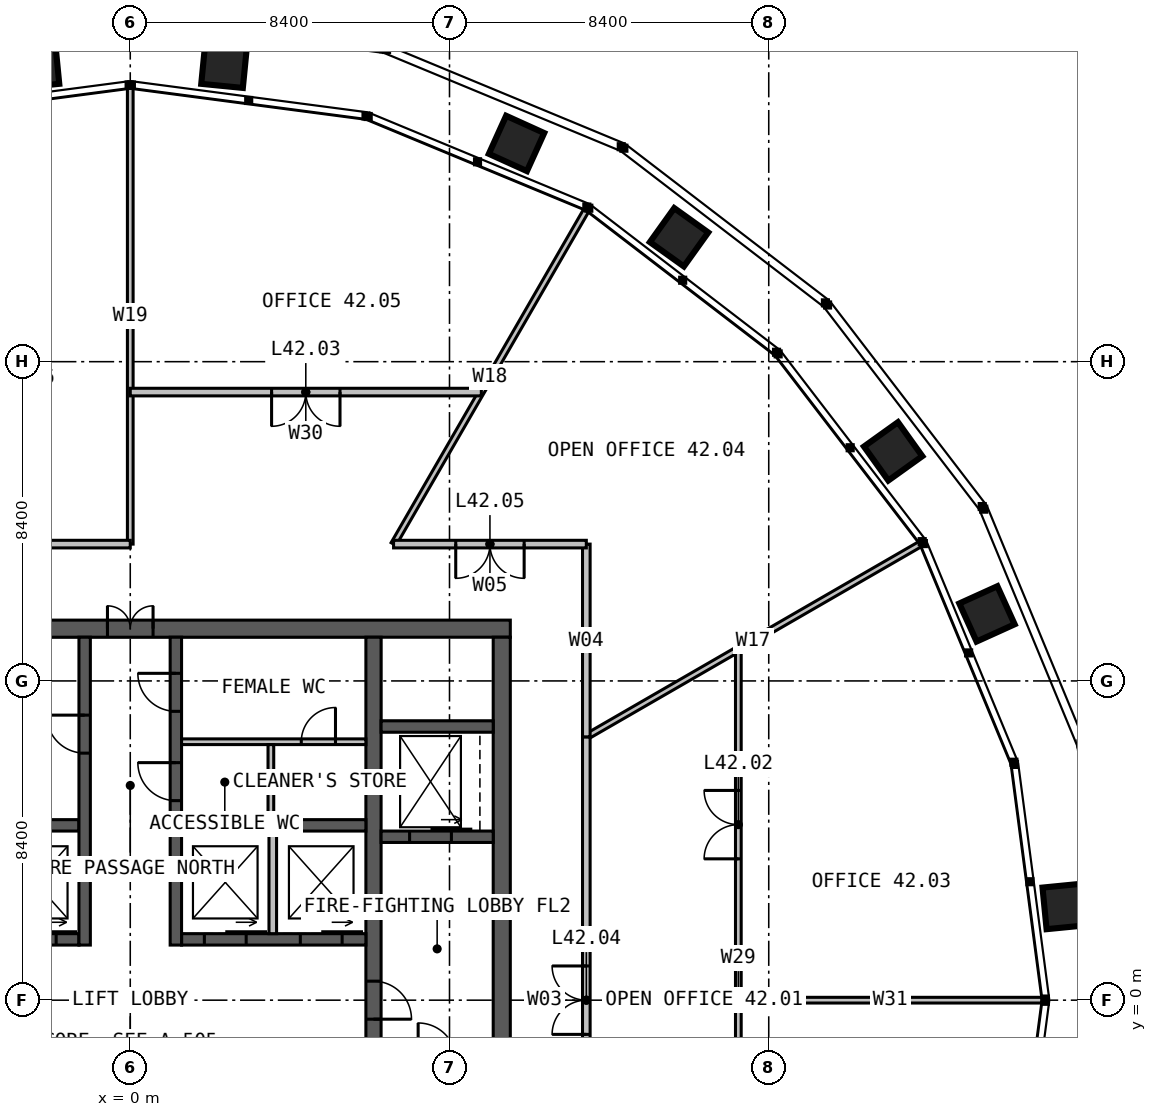
"""IFC4 building model, lengths in metres.
Left out: names, types, materials, properties, quantities, classifications, styles, units other than length and angle.
Written with IfcOpenShell. Run it as: python <this file> out.ifc"""

import sys

from ifc_helpers import new_model, si_unit, direction, frame, frame_2d, origin, place, context, subcontext, project, spatial, rectangle, extrude, element, fill, save


model = new_model("IFC4")
c1 = context("Model", 3, precision=1e-05, world=origin(), true_north=direction((0.0, 1.0)))
c2 = subcontext(c1, "Body", "Model", "MODEL_VIEW")
j1 = project(units=[si_unit("LENGTHUNIT", "METRE"), si_unit("PLANEANGLEUNIT", "RADIAN")], contexts=[c1])
p1 = place(None, origin())
s1 = spatial("IfcSite", under=j1, at=p1, CompositionType="ELEMENT")
p2 = place(p1, origin())
s2 = spatial("IfcBuilding", under=s1, at=p2, CompositionType="ELEMENT")
p3 = place(p2, frame((0.0, 0.0, 175.0)))
s3 = spatial("IfcBuildingStorey", under=s2, at=p3, CompositionType="ELEMENT", Elevation=175.0)
p4 = place(p3, frame((-10.0, 9.775, 0.0), z_axis=(0.0, 0.0, 1.0), x_axis=(1.0, 0.0, 0.0)))
e1 = element("IfcWall", 1, at=p4, inside=s3, PredefinedType="SOLIDWALL", context=c2, shape_type="SweptSolid", body=[
    extrude(rectangle(XDim=20.0, YDim=0.45, at=frame_2d((10.0, 0.0))), origin(), (0.0, 0.0, 1.0), 4.0),
])
p5 = place(p4, frame((9.4, 0.0, 0.0)))
e2 = element("IfcOpeningElement", 2, at=p5, cuts=e1, PredefinedType="OPENING", context=c2, shape_type="SweptSolid", body=[
    extrude(rectangle(XDim=1.2, YDim=2.2, at=frame_2d((0.6, 1.1))), frame((0.0, 0.235, 0.0), z_axis=(0.0, -1.0, 0.0), x_axis=(1.0, 0.0, 0.0)), (0.0, 0.0, 1.0), 0.47),
])
p6 = place(p3, frame((9.775, -9.55, 0.0), z_axis=(0.0, 0.0, 1.0), x_axis=(0.0, 1.0, 0.0)))
e3 = element("IfcWall", 3, at=p6, inside=s3, PredefinedType="SOLIDWALL", context=c2, shape_type="SweptSolid", body=[
    extrude(rectangle(XDim=19.1, YDim=0.45, at=frame_2d((9.55, 0.0))), origin(), (0.0, 0.0, 1.0), 4.0),
])
p7 = place(p3, frame((6.4, 9.55, 0.0), z_axis=(0.0, 0.0, 1.0), x_axis=(0.0, -1.0, 0.0)))
e4 = element("IfcWall", 4, at=p7, inside=s3, PredefinedType="SOLIDWALL", context=c2, shape_type="SweptSolid", body=[
    extrude(rectangle(XDim=19.1, YDim=0.4, at=frame_2d((9.55, 0.0))), origin(), (0.0, 0.0, 1.0), 4.0),
])
p8 = place(p7, frame((9.05, 0.0, 0.0)))
e5 = element("IfcOpeningElement", 5, at=p8, cuts=e4, PredefinedType="OPENING", context=c2, shape_type="SweptSolid", body=[
    extrude(rectangle(XDim=1.0, YDim=2.2, at=frame_2d((0.5, 1.1))), frame((0.0, 0.21, 0.0), z_axis=(0.0, -1.0, 0.0), x_axis=(1.0, 0.0, 0.0)), (0.0, 0.0, 1.0), 0.42),
])
p9 = place(p3, frame((-6.2, 1.6, 0.0), z_axis=(0.0, 0.0, 1.0), x_axis=(1.0, 0.0, 0.0)))
e6 = element("IfcWall", 6, at=p9, inside=s3, PredefinedType="SOLIDWALL", context=c2, shape_type="SweptSolid", body=[
    extrude(rectangle(XDim=4.85, YDim=0.3, at=frame_2d((2.425, 0.0))), origin(), (0.0, 0.0, 1.0), 4.0),
])
p10 = place(p9, frame((0.625, 0.0, 0.0)))
e7 = element("IfcOpeningElement", 7, at=p10, cuts=e6, PredefinedType="OPENING", context=c2, shape_type="SweptSolid", body=[
    extrude(rectangle(XDim=1.1, YDim=2.2, at=frame_2d((0.55, 1.1))), frame((0.0, 0.16, 0.0), z_axis=(0.0, -1.0, 0.0), x_axis=(1.0, 0.0, 0.0)), (0.0, 0.0, 1.0), 0.32),
])
p11 = place(p9, frame((3.15, 0.0, 0.0)))
e8 = element("IfcOpeningElement", 8, at=p11, cuts=e6, PredefinedType="OPENING", context=c2, shape_type="SweptSolid", body=[
    extrude(rectangle(XDim=1.1, YDim=2.2, at=frame_2d((0.55, 1.1))), frame((0.0, 0.16, 0.0), z_axis=(0.0, -1.0, 0.0), x_axis=(1.0, 0.0, 0.0)), (0.0, 0.0, 1.0), 0.32),
])
p12 = place(p3, frame((1.35, 1.6, 0.0), z_axis=(0.0, 0.0, 1.0), x_axis=(1.0, 0.0, 0.0)))
e9 = element("IfcWall", 9, at=p12, inside=s3, PredefinedType="SOLIDWALL", context=c2, shape_type="SweptSolid", body=[
    extrude(rectangle(XDim=4.85, YDim=0.3, at=frame_2d((2.425, 0.0))), origin(), (0.0, 0.0, 1.0), 4.0),
])
p13 = place(p12, frame((0.6, 0.0, 0.0)))
e10 = element("IfcOpeningElement", 10, at=p13, cuts=e9, PredefinedType="OPENING", context=c2, shape_type="SweptSolid", body=[
    extrude(rectangle(XDim=1.1, YDim=2.2, at=frame_2d((0.55, 1.1))), frame((0.0, 0.16, 0.0), z_axis=(0.0, -1.0, 0.0), x_axis=(1.0, 0.0, 0.0)), (0.0, 0.0, 1.0), 0.32),
])
p14 = place(p12, frame((3.125, 0.0, 0.0)))
e11 = element("IfcOpeningElement", 11, at=p14, cuts=e9, PredefinedType="OPENING", context=c2, shape_type="SweptSolid", body=[
    extrude(rectangle(XDim=1.1, YDim=2.2, at=frame_2d((0.55, 1.1))), frame((0.0, 0.16, 0.0), z_axis=(0.0, -1.0, 0.0), x_axis=(1.0, 0.0, 0.0)), (0.0, 0.0, 1.0), 0.32),
])
for number, where, z_axis, x_axis in (
    (12, (-6.2, 4.6, 0.0), (0.0, 0.0, 1.0), (1.0, 0.0, 0.0)),
    (13, (1.35, 4.6, 0.0), (0.0, 0.0, 1.0), (1.0, 0.0, 0.0)),
):
    element("IfcWall", number, at=place(p3, frame(where, z_axis=z_axis, x_axis=x_axis)), inside=s3, PredefinedType="SOLIDWALL", context=c2, shape_type="SweptSolid", body=[
        extrude(rectangle(XDim=4.85, YDim=0.3, at=frame_2d((2.425, 0.0))), origin(), (0.0, 0.0, 1.0), 4.0),
    ])
p15 = place(p3, frame((-1.2, 1.45, 0.0), z_axis=(0.0, 0.0, 1.0), x_axis=(0.0, 1.0, 0.0)))
e14 = element("IfcWall", 14, at=p15, inside=s3, PredefinedType="SOLIDWALL", context=c2, shape_type="SweptSolid", body=[
    extrude(rectangle(XDim=8.1, YDim=0.3, at=frame_2d((4.05, 0.0))), origin(), (0.0, 0.0, 1.0), 4.0),
])
p16 = place(p15, frame((5.05, 0.0, 0.0)))
e15 = element("IfcOpeningElement", 15, at=p16, cuts=e14, PredefinedType="OPENING", context=c2, shape_type="SweptSolid", body=[
    extrude(rectangle(XDim=1.0, YDim=2.2, at=frame_2d((0.5, 1.1))), frame((0.0, 0.16, 0.0), z_axis=(0.0, -1.0, 0.0), x_axis=(1.0, 0.0, 0.0)), (0.0, 0.0, 1.0), 0.32),
])
p17 = place(p3, frame((1.2, 1.45, 0.0), z_axis=(0.0, 0.0, 1.0), x_axis=(0.0, 1.0, 0.0)))
e16 = element("IfcWall", 16, at=p17, inside=s3, PredefinedType="SOLIDWALL", context=c2, shape_type="SweptSolid", body=[
    extrude(rectangle(XDim=8.1, YDim=0.3, at=frame_2d((4.05, 0.0))), origin(), (0.0, 0.0, 1.0), 4.0),
])
p18 = place(p17, frame((3.8, 0.0, 0.0)))
e17 = element("IfcOpeningElement", 17, at=p18, cuts=e16, PredefinedType="OPENING", context=c2, shape_type="SweptSolid", body=[
    extrude(rectangle(XDim=1.0, YDim=2.2, at=frame_2d((0.5, 1.1))), frame((0.0, 0.16, 0.0), z_axis=(0.0, -1.0, 0.0), x_axis=(1.0, 0.0, 0.0)), (0.0, 0.0, 1.0), 0.32),
])
p19 = place(p17, frame((6.15, 0.0, 0.0)))
e18 = element("IfcOpeningElement", 18, at=p19, cuts=e16, PredefinedType="OPENING", context=c2, shape_type="SweptSolid", body=[
    extrude(rectangle(XDim=1.0, YDim=2.2, at=frame_2d((0.5, 1.1))), frame((0.0, 0.16, 0.0), z_axis=(0.0, -1.0, 0.0), x_axis=(1.0, 0.0, 0.0)), (0.0, 0.0, 1.0), 0.32),
])
p20 = place(p3, frame((6.6, 4.3, 0.0), z_axis=(0.0, 0.0, 1.0), x_axis=(1.0, 0.0, 0.0)))
e19 = element("IfcWall", 19, at=p20, inside=s3, PredefinedType="SOLIDWALL", context=c2, shape_type="SweptSolid", body=[
    extrude(rectangle(XDim=2.95, YDim=0.3, at=frame_2d((1.475, 0.0))), origin(), (0.0, 0.0, 1.0), 4.0),
])
p21 = place(p20, frame((0.75, 0.0, 0.0)))
e20 = element("IfcOpeningElement", 20, at=p21, cuts=e19, PredefinedType="OPENING", context=c2, shape_type="SweptSolid", body=[
    extrude(rectangle(XDim=1.1, YDim=2.2, at=frame_2d((0.55, 1.1))), frame((0.0, 0.16, 0.0), z_axis=(0.0, -1.0, 0.0), x_axis=(1.0, 0.0, 0.0)), (0.0, 0.0, 1.0), 0.32),
])
p22 = place(p3, frame((6.6, 7.2, 0.0), z_axis=(0.0, 0.0, 1.0), x_axis=(1.0, 0.0, 0.0)))
e21 = element("IfcWall", 21, at=p22, inside=s3, PredefinedType="SOLIDWALL", context=c2, shape_type="SweptSolid", body=[
    extrude(rectangle(XDim=2.95, YDim=0.3, at=frame_2d((1.475, 0.0))), origin(), (0.0, 0.0, 1.0), 4.0),
])
p23 = place(p3, frame((3.75, 1.75, 0.0), z_axis=(0.0, 0.0, 1.0), x_axis=(0.0, 1.0, 0.0)))
e22 = element("IfcWall", 22, at=p23, inside=s3, PredefinedType="SOLIDWALL", context=c2, shape_type="SweptSolid", body=[
    extrude(rectangle(XDim=2.7, YDim=0.2, at=frame_2d((1.35, 0.0))), origin(), (0.0, 0.0, 1.0), 3.75),
])
p24 = place(p3, frame((1.35, 6.8, 0.0), z_axis=(0.0, 0.0, 1.0), x_axis=(1.0, 0.0, 0.0)))
e23 = element("IfcWall", 23, at=p24, inside=s3, PredefinedType="PARTITIONING", context=c2, shape_type="SweptSolid", body=[
    extrude(rectangle(XDim=4.85, YDim=0.15, at=frame_2d((2.425, 0.0))), origin(), (0.0, 0.0, 1.0), 3.75),
])
p25 = place(p24, frame((3.15, 0.0, 0.0)))
e24 = element("IfcOpeningElement", 24, at=p25, cuts=e23, PredefinedType="OPENING", context=c2, shape_type="SweptSolid", body=[
    extrude(rectangle(XDim=0.9, YDim=2.2, at=frame_2d((0.45, 1.1))), frame((0.0, 0.085, 0.0), z_axis=(0.0, -1.0, 0.0), x_axis=(1.0, 0.0, 0.0)), (0.0, 0.0, 1.0), 0.17),
])
p26 = place(p3, frame((3.7, 4.75, 0.0), z_axis=(0.0, 0.0, 1.0), x_axis=(0.0, 1.0, 0.0)))
e25 = element("IfcWall", 25, at=p26, inside=s3, PredefinedType="PARTITIONING", context=c2, shape_type="SweptSolid", body=[
    extrude(rectangle(XDim=1.975, YDim=0.15, at=frame_2d((0.988, 0.0))), origin(), (0.0, 0.0, 1.0), 3.75),
])
for number, where, z_axis, x_axis in (
    (26, (12.0, 6.928, 0.0), (0.0, 0.0, 1.0), (0.866, 0.5, 0.0)),
    (27, (6.928, 12.0, 0.0), (0.0, 0.0, 1.0), (0.5, 0.866, 0.0)),
):
    element("IfcWall", number, at=place(p3, frame(where, z_axis=z_axis, x_axis=x_axis)), inside=s3, PredefinedType="PARTITIONING", context=c2, shape_type="SweptSolid", body=[
        extrude(rectangle(XDim=10.136, YDim=0.15, at=frame_2d((5.068, 0.0))), origin(), (0.0, 0.0, 1.0), 2.79),
    ])
p27 = place(p3, frame((0.0, 12.0, 0.0), z_axis=(0.0, 0.0, 1.0), x_axis=(0.0, 1.0, 0.0)))
e28 = element("IfcWall", 28, at=p27, inside=s3, PredefinedType="PARTITIONING", context=c2, shape_type="SweptSolid", body=[
    extrude(rectangle(XDim=11.992, YDim=0.15, at=frame_2d((5.996, 0.0))), origin(), (0.0, 0.0, 1.0), 2.79),
])
p28 = place(p3, frame((16.0, -9.238, 0.0), z_axis=(0.0, 0.0, 1.0), x_axis=(0.0, 1.0, 0.0)))
e29 = element("IfcWall", 29, at=p28, inside=s3, PredefinedType="PARTITIONING", context=c2, shape_type="SweptSolid", body=[
    extrude(rectangle(XDim=18.475, YDim=0.15, at=frame_2d((9.238, 0.0))), origin(), (0.0, 0.0, 1.0), 2.79),
])
p29 = place(p28, frame((3.719, 0.0, 0.0)))
e30 = element("IfcOpeningElement", 30, at=p29, cuts=e29, PredefinedType="OPENING", context=c2, shape_type="SweptSolid", body=[
    extrude(rectangle(XDim=1.8, YDim=2.2, at=frame_2d((0.9, 1.1))), frame((0.0, 0.085, 0.0), z_axis=(0.0, -1.0, 0.0), x_axis=(1.0, 0.0, 0.0)), (0.0, 0.0, 1.0), 0.17),
])
p30 = place(p28, frame((12.956, 0.0, 0.0)))
e31 = element("IfcOpeningElement", 31, at=p30, cuts=e29, PredefinedType="OPENING", context=c2, shape_type="SweptSolid", body=[
    extrude(rectangle(XDim=1.8, YDim=2.2, at=frame_2d((0.9, 1.1))), frame((0.0, 0.085, 0.0), z_axis=(0.0, -1.0, 0.0), x_axis=(1.0, 0.0, 0.0)), (0.0, 0.0, 1.0), 0.17),
])
p31 = place(p3, frame((16.0, 0.0, 0.0), z_axis=(0.0, 0.0, 1.0), x_axis=(1.0, 0.0, 0.0)))
e32 = element("IfcWall", 32, at=p31, inside=s3, PredefinedType="PARTITIONING", context=c2, shape_type="SweptSolid", body=[
    extrude(rectangle(XDim=7.992, YDim=0.15, at=frame_2d((3.996, 0.0))), origin(), (0.0, 0.0, 1.0), 2.79),
])
p32 = place(p3, frame((12.0, -6.928, 0.0), z_axis=(0.0, 0.0, 1.0), x_axis=(0.0, 1.0, 0.0)))
e33 = element("IfcWall", 33, at=p32, inside=s3, PredefinedType="PARTITIONING", context=c2, shape_type="SweptSolid", body=[
    extrude(rectangle(XDim=13.856, YDim=0.2, at=frame_2d((6.928, 0.0))), origin(), (0.0, 0.0, 1.0), 3.8),
])
p33 = place(p32, frame((6.028, 0.0, 0.0)))
e34 = element("IfcOpeningElement", 34, at=p33, cuts=e33, PredefinedType="OPENING", context=c2, shape_type="SweptSolid", body=[
    extrude(rectangle(XDim=1.8, YDim=2.2, at=frame_2d((0.9, 1.1))), frame((0.0, 0.11, 0.0), z_axis=(0.0, -1.0, 0.0), x_axis=(1.0, 0.0, 0.0)), (0.0, 0.0, 1.0), 0.22),
])
p34 = place(p3, frame((12.0, 6.928, 0.0), z_axis=(0.0, 0.0, 1.0), x_axis=(0.0, 1.0, 0.0)))
e35 = element("IfcWall", 35, at=p34, inside=s3, PredefinedType="PARTITIONING", context=c2, shape_type="SweptSolid", body=[
    extrude(rectangle(XDim=5.072, YDim=0.2, at=frame_2d((2.536, 0.0))), origin(), (0.0, 0.0, 1.0), 3.8),
])
p35 = place(p3, frame((12.0, 12.0, 0.0), z_axis=(0.0, 0.0, 1.0), x_axis=(-1.0, 0.0, 0.0)))
e36 = element("IfcWall", 36, at=p35, inside=s3, PredefinedType="PARTITIONING", context=c2, shape_type="SweptSolid", body=[
    extrude(rectangle(XDim=5.072, YDim=0.2, at=frame_2d((2.536, 0.0))), origin(), (0.0, 0.0, 1.0), 3.8),
])
p36 = place(p35, frame((1.636, 0.0, 0.0)))
e37 = element("IfcOpeningElement", 37, at=p36, cuts=e36, PredefinedType="OPENING", context=c2, shape_type="SweptSolid", body=[
    extrude(rectangle(XDim=1.8, YDim=2.2, at=frame_2d((0.9, 1.1))), frame((0.0, 0.11, 0.0), z_axis=(0.0, -1.0, 0.0), x_axis=(1.0, 0.0, 0.0)), (0.0, 0.0, 1.0), 0.22),
])
p37 = place(p3, frame((9.238, 16.0, 0.0), z_axis=(0.0, 0.0, 1.0), x_axis=(-1.0, 0.0, 0.0)))
e38 = element("IfcWall", 38, at=p37, inside=s3, PredefinedType="PARTITIONING", context=c2, shape_type="SweptSolid", body=[
    extrude(rectangle(XDim=9.238, YDim=0.2, at=frame_2d((4.619, 0.0))), origin(), (0.0, 0.0, 1.0), 3.8),
])
p38 = place(p37, frame((3.719, 0.0, 0.0)))
e39 = element("IfcOpeningElement", 39, at=p38, cuts=e38, PredefinedType="OPENING", context=c2, shape_type="SweptSolid", body=[
    extrude(rectangle(XDim=1.8, YDim=2.2, at=frame_2d((0.9, 1.1))), frame((0.0, 0.11, 0.0), z_axis=(0.0, -1.0, 0.0), x_axis=(1.0, 0.0, 0.0)), (0.0, 0.0, 1.0), 0.22),
])
p39 = place(p3, frame((0.0, 12.0, 0.0), z_axis=(0.0, 0.0, 1.0), x_axis=(-1.0, 0.0, 0.0)))
e40 = element("IfcWall", 40, at=p39, inside=s3, PredefinedType="PARTITIONING", context=c2, shape_type="SweptSolid", body=[
    extrude(rectangle(XDim=6.928, YDim=0.2, at=frame_2d((3.464, 0.0))), origin(), (0.0, 0.0, 1.0), 3.8),
])
p40 = place(p39, frame((2.964, 0.0, 0.0)))
e41 = element("IfcOpeningElement", 41, at=p40, cuts=e40, PredefinedType="OPENING", context=c2, shape_type="SweptSolid", body=[
    extrude(rectangle(XDim=1.0, YDim=2.2, at=frame_2d((0.5, 1.1))), frame((0.0, 0.11, 0.0), z_axis=(0.0, -1.0, 0.0), x_axis=(1.0, 0.0, 0.0)), (0.0, 0.0, 1.0), 0.22),
])
p41 = place(p5, origin())
e42 = element("IfcDoor", 42, at=p41, inside=s3, OperationType="DOUBLE_DOOR_SINGLE_SWING", PredefinedType="DOOR", context=c2, shape_type="SweptSolid", body=[
    extrude(rectangle(XDim=1.2, YDim=2.2, at=frame_2d((0.6, 1.1))), frame((0.0, 0.025, 0.0), z_axis=(0.0, -1.0, 0.0), x_axis=(1.0, 0.0, 0.0)), (0.0, 0.0, 1.0), 0.05),
])
fill(e2, e42)
p42 = place(p8, origin())
e43 = element("IfcDoor", 43, at=p42, inside=s3, OperationType="SINGLE_SWING_RIGHT", PredefinedType="DOOR", context=c2, shape_type="SweptSolid", body=[
    extrude(rectangle(XDim=1.0, YDim=2.2, at=frame_2d((0.5, 1.1))), frame((0.0, 0.025, 0.0), z_axis=(0.0, -1.0, 0.0), x_axis=(1.0, 0.0, 0.0)), (0.0, 0.0, 1.0), 0.05),
])
fill(e5, e43)
p43 = place(p16, origin())
e44 = element("IfcDoor", 44, at=p43, inside=s3, OperationType="SINGLE_SWING_RIGHT", PredefinedType="DOOR", context=c2, shape_type="SweptSolid", body=[
    extrude(rectangle(XDim=1.0, YDim=2.2, at=frame_2d((0.5, 1.1))), frame((0.0, 0.025, 0.0), z_axis=(0.0, -1.0, 0.0), x_axis=(1.0, 0.0, 0.0)), (0.0, 0.0, 1.0), 0.05),
])
fill(e15, e44)
p44 = place(p18, origin())
e45 = element("IfcDoor", 45, at=p44, inside=s3, OperationType="SINGLE_SWING_RIGHT", PredefinedType="DOOR", context=c2, shape_type="SweptSolid", body=[
    extrude(rectangle(XDim=1.0, YDim=2.2, at=frame_2d((0.5, 1.1))), frame((0.0, 0.025, 0.0), z_axis=(0.0, -1.0, 0.0), x_axis=(1.0, 0.0, 0.0)), (0.0, 0.0, 1.0), 0.05),
])
fill(e17, e45)
p45 = place(p19, origin())
e46 = element("IfcDoor", 46, at=p45, inside=s3, OperationType="SINGLE_SWING_RIGHT", PredefinedType="DOOR", context=c2, shape_type="SweptSolid", body=[
    extrude(rectangle(XDim=1.0, YDim=2.2, at=frame_2d((0.5, 1.1))), frame((0.0, 0.025, 0.0), z_axis=(0.0, -1.0, 0.0), x_axis=(1.0, 0.0, 0.0)), (0.0, 0.0, 1.0), 0.05),
])
fill(e18, e46)
p46 = place(p25, origin())
e47 = element("IfcDoor", 47, at=p46, inside=s3, OperationType="SINGLE_SWING_RIGHT", PredefinedType="DOOR", context=c2, shape_type="SweptSolid", body=[
    extrude(rectangle(XDim=0.9, YDim=2.2, at=frame_2d((0.45, 1.1))), frame((0.0, 0.025, 0.0), z_axis=(0.0, -1.0, 0.0), x_axis=(1.0, 0.0, 0.0)), (0.0, 0.0, 1.0), 0.05),
])
fill(e24, e47)
p47 = place(p11, origin())
e48 = element("IfcDoor", 48, at=p47, inside=s3, OperationType="SLIDING_TO_LEFT", PredefinedType="DOOR", context=c2, shape_type="SweptSolid", body=[
    extrude(rectangle(XDim=1.1, YDim=2.2, at=frame_2d((0.55, 1.1))), frame((0.0, 0.025, 0.0), z_axis=(0.0, -1.0, 0.0), x_axis=(1.0, 0.0, 0.0)), (0.0, 0.0, 1.0), 0.05),
])
fill(e8, e48)
p48 = place(p13, origin())
e49 = element("IfcDoor", 49, at=p48, inside=s3, OperationType="SLIDING_TO_LEFT", PredefinedType="DOOR", context=c2, shape_type="SweptSolid", body=[
    extrude(rectangle(XDim=1.1, YDim=2.2, at=frame_2d((0.55, 1.1))), frame((0.0, 0.025, 0.0), z_axis=(0.0, -1.0, 0.0), x_axis=(1.0, 0.0, 0.0)), (0.0, 0.0, 1.0), 0.05),
])
fill(e10, e49)
p49 = place(p14, origin())
e50 = element("IfcDoor", 50, at=p49, inside=s3, OperationType="SLIDING_TO_LEFT", PredefinedType="DOOR", context=c2, shape_type="SweptSolid", body=[
    extrude(rectangle(XDim=1.1, YDim=2.2, at=frame_2d((0.55, 1.1))), frame((0.0, 0.025, 0.0), z_axis=(0.0, -1.0, 0.0), x_axis=(1.0, 0.0, 0.0)), (0.0, 0.0, 1.0), 0.05),
])
fill(e11, e50)
p50 = place(p21, origin())
e51 = element("IfcDoor", 51, at=p50, inside=s3, OperationType="SLIDING_TO_LEFT", PredefinedType="DOOR", context=c2, shape_type="SweptSolid", body=[
    extrude(rectangle(XDim=1.1, YDim=2.2, at=frame_2d((0.55, 1.1))), frame((0.0, 0.025, 0.0), z_axis=(0.0, -1.0, 0.0), x_axis=(1.0, 0.0, 0.0)), (0.0, 0.0, 1.0), 0.05),
])
fill(e20, e51)
p51 = place(p30, origin())
e52 = element("IfcDoor", 52, at=p51, inside=s3, OperationType="DOUBLE_DOOR_SINGLE_SWING", PredefinedType="DOOR", context=c2, shape_type="SweptSolid", body=[
    extrude(rectangle(XDim=1.8, YDim=2.2, at=frame_2d((0.9, 1.1))), frame((0.0, 0.025, 0.0), z_axis=(0.0, -1.0, 0.0), x_axis=(1.0, 0.0, 0.0)), (0.0, 0.0, 1.0), 0.05),
])
fill(e31, e52)
p52 = place(p33, origin())
e53 = element("IfcDoor", 53, at=p52, inside=s3, OperationType="DOUBLE_DOOR_SINGLE_SWING", PredefinedType="DOOR", context=c2, shape_type="SweptSolid", body=[
    extrude(rectangle(XDim=1.8, YDim=2.2, at=frame_2d((0.9, 1.1))), frame((0.0, 0.025, 0.0), z_axis=(0.0, -1.0, 0.0), x_axis=(1.0, 0.0, 0.0)), (0.0, 0.0, 1.0), 0.05),
])
fill(e34, e53)
p53 = place(p36, origin())
e54 = element("IfcDoor", 54, at=p53, inside=s3, OperationType="DOUBLE_DOOR_SINGLE_SWING", PredefinedType="DOOR", context=c2, shape_type="SweptSolid", body=[
    extrude(rectangle(XDim=1.8, YDim=2.2, at=frame_2d((0.9, 1.1))), frame((0.0, 0.025, 0.0), z_axis=(0.0, -1.0, 0.0), x_axis=(1.0, 0.0, 0.0)), (0.0, 0.0, 1.0), 0.05),
])
fill(e37, e54)
p54 = place(p38, origin())
e55 = element("IfcDoor", 55, at=p54, inside=s3, OperationType="DOUBLE_DOOR_SINGLE_SWING", PredefinedType="DOOR", context=c2, shape_type="SweptSolid", body=[
    extrude(rectangle(XDim=1.8, YDim=2.2, at=frame_2d((0.9, 1.1))), frame((0.0, 0.025, 0.0), z_axis=(0.0, -1.0, 0.0), x_axis=(1.0, 0.0, 0.0)), (0.0, 0.0, 1.0), 0.05),
])
fill(e39, e55)
save(model, sys.argv[1])
